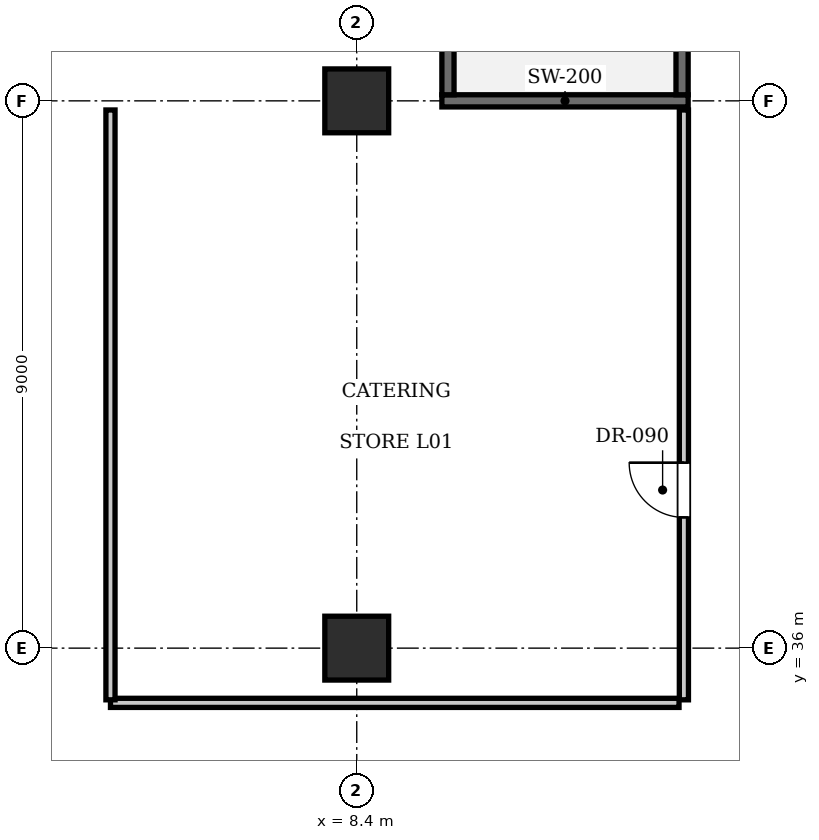
"""IFC4 building model, lengths in metres.
Left out: names, types, materials, properties, quantities, classifications, styles, units other than length and angle.
Written with IfcOpenShell. Run it as: python <this file> out.ifc"""

import sys

from ifc_helpers import new_model, si_unit, direction, frame, frame_2d, origin, origin_2d, place, context, subcontext, project, spatial, rectangle, extrude, element, fill, save


model = new_model("IFC4")
c1 = context("Model", 3, precision=1e-05, world=origin(), true_north=direction((0.0, 1.0)))
c2 = subcontext(c1, "Body", "Model", "MODEL_VIEW")
j1 = project(units=[si_unit("LENGTHUNIT", "METRE"), si_unit("PLANEANGLEUNIT", "RADIAN")], contexts=[c1])
p1 = place(None, origin())
s1 = spatial("IfcSite", under=j1, at=p1, CompositionType="ELEMENT")
p2 = place(p1, origin())
s2 = spatial("IfcBuilding", under=s1, at=p2, CompositionType="ELEMENT")
p3 = place(p2, frame((0.0, 0.0, 5.6)))
s3 = spatial("IfcBuildingStorey", under=s2, at=p3, CompositionType="ELEMENT", Elevation=5.6)
for number, where, z_axis, x_axis in (
    (1, (8.4, 36.0, 0.0), (0.0, 0.0, 1.0), (1.0, 0.0, 0.0)),
    (2, (8.4, 45.0, 0.0), (0.0, 0.0, 1.0), (1.0, 0.0, 0.0)),
):
    element("IfcColumn", number, at=place(p3, frame(where, z_axis=z_axis, x_axis=x_axis)), inside=s3, PredefinedType="COLUMN", context=c2, shape_type="SweptSolid", body=[
        extrude(rectangle(XDim=1.05, YDim=1.05, at=origin_2d()), origin(), (0.0, 0.0, 1.0), 5.25),
    ])
p4 = place(p3, frame((9.8, 45.0, 0.0), z_axis=(0.0, 0.0, 1.0), x_axis=(1.0, 0.0, 0.0)))
e3 = element("IfcWall", 3, at=p4, inside=s3, PredefinedType="SOLIDWALL", context=c2, shape_type="SweptSolid", body=[
    extrude(rectangle(XDim=4.05, YDim=0.2, at=frame_2d((2.025, 0.0))), origin(), (0.0, 0.0, 1.0), 4.335),
])
p5 = place(p3, frame((9.9, 45.1, 0.0), z_axis=(0.0, 0.0, 1.0), x_axis=(0.0, 1.0, 0.0)))
e4 = element("IfcWall", 4, at=p5, inside=s3, PredefinedType="SOLIDWALL", context=c2, shape_type="SweptSolid", body=[
    extrude(rectangle(XDim=8.1, YDim=0.2, at=frame_2d((4.05, 0.0))), origin(), (0.0, 0.0, 1.0), 4.97),
])
p6 = place(p3, frame((13.75, 45.1, 0.0), z_axis=(0.0, 0.0, 1.0), x_axis=(0.0, 1.0, 0.0)))
e5 = element("IfcWall", 5, at=p6, inside=s3, PredefinedType="SOLIDWALL", context=c2, shape_type="SweptSolid", body=[
    extrude(rectangle(XDim=8.1, YDim=0.2, at=frame_2d((4.05, 0.0))), origin(), (0.0, 0.0, 1.0), 4.97),
])
p7 = place(p6, frame((6.32, 0.0, 0.0)))
e6 = element("IfcOpeningElement", 6, at=p7, cuts=e5, PredefinedType="OPENING", context=c2, shape_type="SweptSolid", body=[
    extrude(rectangle(XDim=1.15, YDim=2.15, at=frame_2d((0.575, 1.075))), frame((0.0, 0.11, 0.0), z_axis=(0.0, -1.0, 0.0), x_axis=(1.0, 0.0, 0.0)), (0.0, 0.0, 1.0), 0.22),
])
p8 = place(p3, frame((13.78, 35.15, 0.0), z_axis=(0.0, 0.0, 1.0), x_axis=(0.0, 1.0, 0.0)))
e7 = element("IfcWall", 7, at=p8, inside=s3, PredefinedType="PARTITIONING", context=c2, shape_type="SweptSolid", body=[
    extrude(rectangle(XDim=9.7, YDim=0.15, at=frame_2d((4.85, 0.0))), origin(), (0.0, 0.0, 1.0), 4.97),
])
p9 = place(p8, frame((3.0, 0.0, 0.0)))
e8 = element("IfcOpeningElement", 8, at=p9, cuts=e7, PredefinedType="OPENING", context=c2, shape_type="SweptSolid", body=[
    extrude(rectangle(XDim=0.9, YDim=2.1, at=frame_2d((0.45, 1.05))), frame((0.0, 0.085, 0.0), z_axis=(0.0, -1.0, 0.0), x_axis=(1.0, 0.0, 0.0)), (0.0, 0.0, 1.0), 0.17),
])
p10 = place(p3, frame((4.35, 35.1, 0.0), z_axis=(0.0, 0.0, 1.0), x_axis=(1.0, 0.0, 0.0)))
e9 = element("IfcWall", 9, at=p10, inside=s3, PredefinedType="PARTITIONING", context=c2, shape_type="SweptSolid", body=[
    extrude(rectangle(XDim=9.35, YDim=0.15, at=frame_2d((4.675, 0.0))), origin(), (0.0, 0.0, 1.0), 4.97),
])
p11 = place(p3, frame((4.35, 35.15, 0.0), z_axis=(0.0, 0.0, 1.0), x_axis=(0.0, 1.0, 0.0)))
e10 = element("IfcWall", 10, at=p11, inside=s3, PredefinedType="PARTITIONING", context=c2, shape_type="SweptSolid", body=[
    extrude(rectangle(XDim=9.7, YDim=0.15, at=frame_2d((4.85, 0.0))), origin(), (0.0, 0.0, 1.0), 4.97),
])
p12 = place(p9, origin())
e11 = element("IfcDoor", 11, at=p12, inside=s3, OperationType="SINGLE_SWING_RIGHT", PredefinedType="DOOR", context=c2, shape_type="SweptSolid", body=[
    extrude(rectangle(XDim=0.9, YDim=2.1, at=frame_2d((0.45, 1.05))), frame((0.0, 0.025, 0.0), z_axis=(0.0, -1.0, 0.0), x_axis=(1.0, 0.0, 0.0)), (0.0, 0.0, 1.0), 0.05),
])
fill(e8, e11)
save(model, sys.argv[1])
